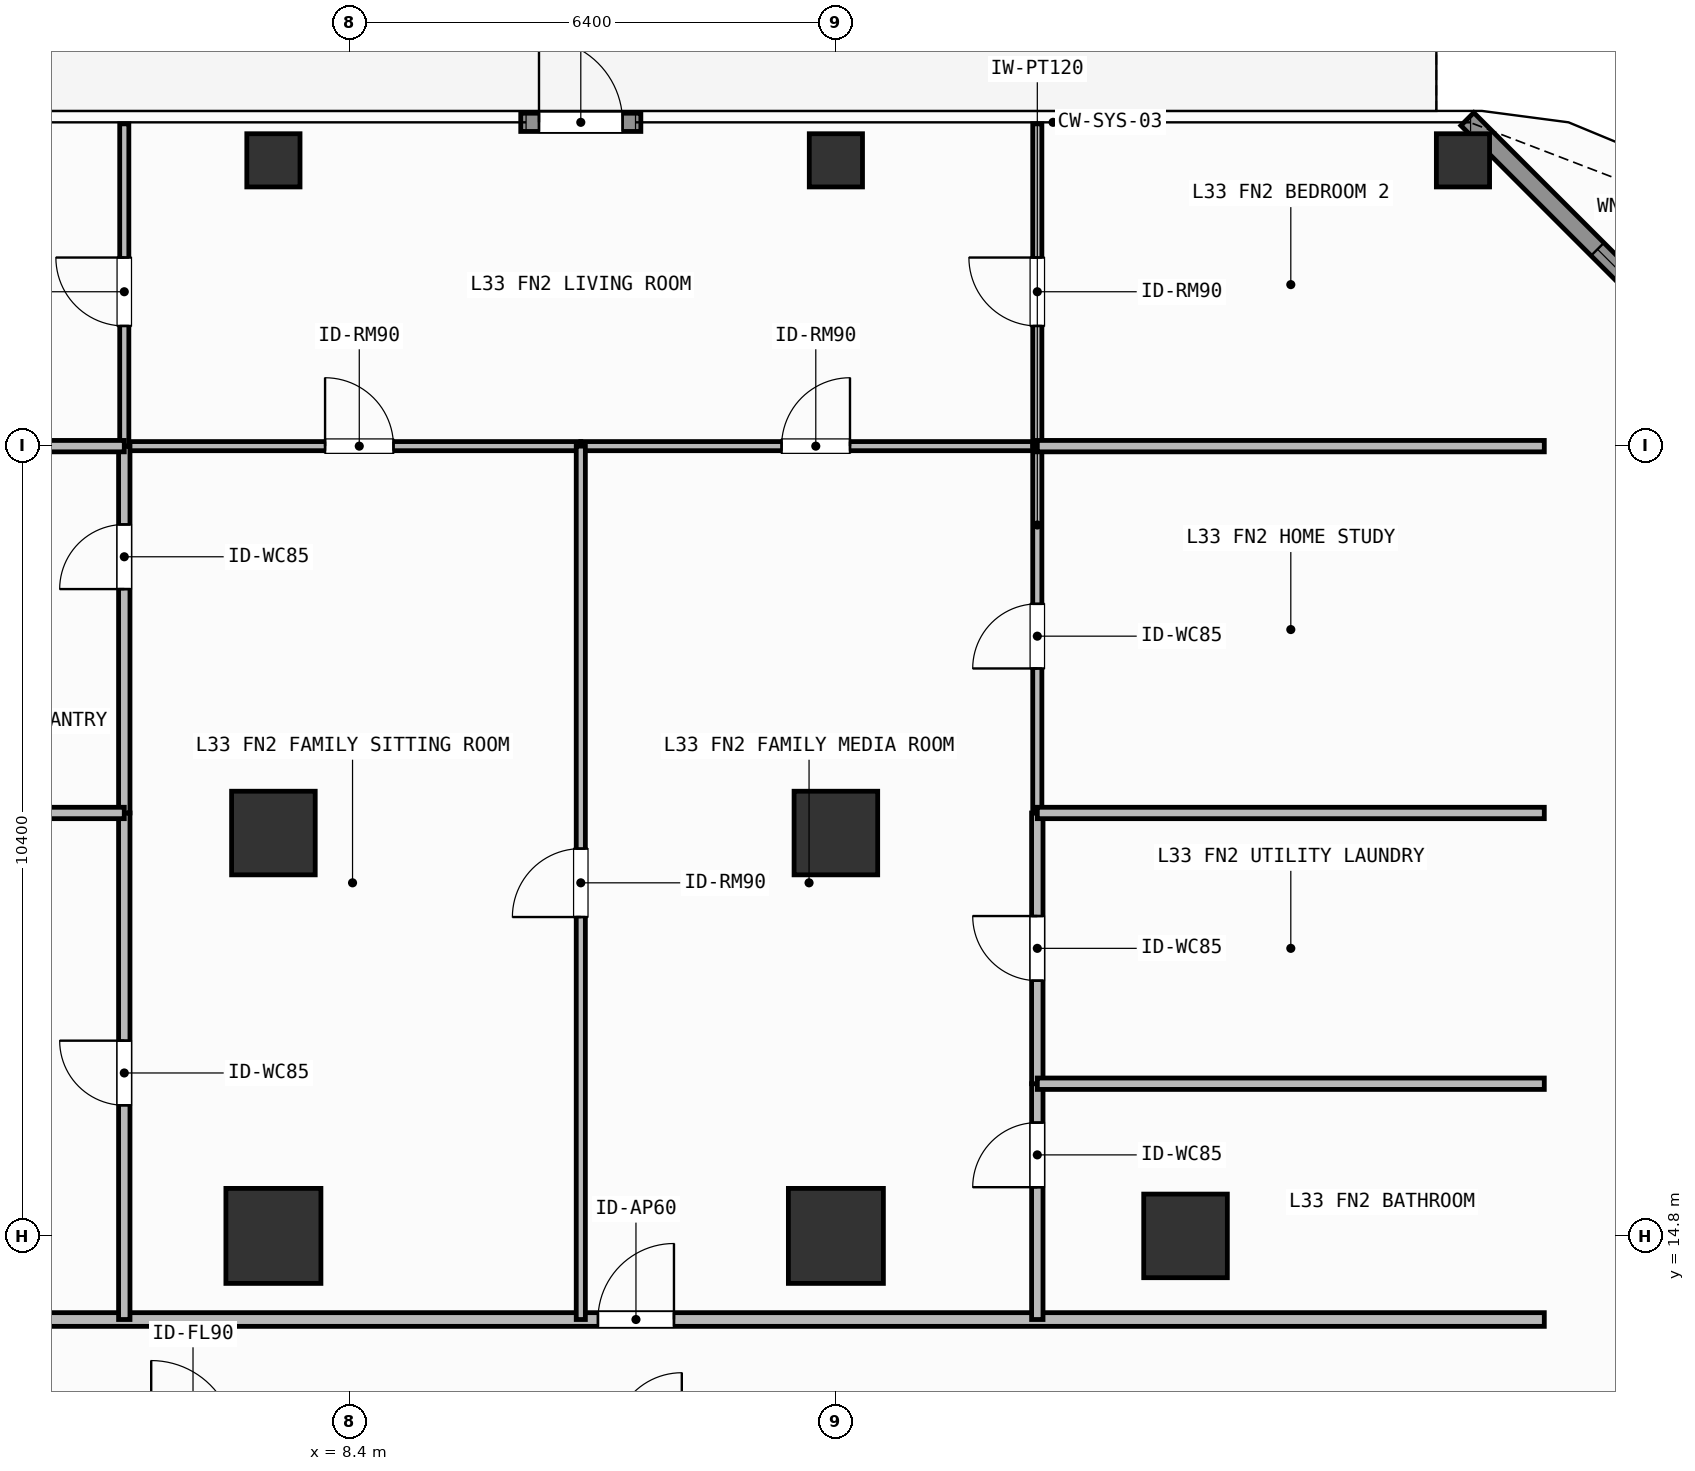
"""IFC4 building model, lengths in metres.
Left out: names, types, materials, properties, quantities, classifications, styles, units other than length and angle.
Written with IfcOpenShell. Run it as: python <this file> out.ifc"""

import sys

from ifc_helpers import new_model, si_unit, direction, frame, frame_2d, origin, origin_2d, place, context, subcontext, project, spatial, rectangle, hollow_rectangle, extrude, element, fill, save


model = new_model("IFC4")
c1 = context("Model", 3, precision=1e-05, world=origin(), true_north=direction((0.0, 1.0)))
c2 = subcontext(c1, "Body", "Model", "MODEL_VIEW")
j1 = project(units=[si_unit("LENGTHUNIT", "METRE"), si_unit("PLANEANGLEUNIT", "RADIAN")], contexts=[c1])
p1 = place(None, origin())
s1 = spatial("IfcSite", under=j1, at=p1, CompositionType="ELEMENT")
p2 = place(p1, origin())
s2 = spatial("IfcBuilding", under=s1, at=p2, CompositionType="ELEMENT")
p3 = place(p2, frame((0.0, 0.0, 132.9)))
s3 = spatial("IfcBuildingStorey", under=s2, at=p3, CompositionType="ELEMENT", Elevation=132.9)
for number, where, z_axis, x_axis in (
    (1, (7.4, 14.8, 0.0), (0.0, 0.0, 1.0), (1.0, 0.0, 0.0)),
    (2, (14.8, 14.8, 0.0), (0.0, 0.0, 1.0), (1.0, 0.0, 0.0)),
):
    element("IfcColumn", number, at=place(p3, frame(where, z_axis=z_axis, x_axis=x_axis)), inside=s3, PredefinedType="COLUMN", context=c2, shape_type="SweptSolid", body=[
        extrude(rectangle(XDim=1.25, YDim=1.25, at=origin_2d()), origin(), (0.0, 0.0, 1.0), 3.9),
    ])
for number, where, z_axis, x_axis in (
    (3, (19.4, 14.8, 0.0), (0.0, 0.0, 1.0), (1.0, 0.0, 0.0)),
    (4, (7.4, 20.1, 0.0), (0.0, 0.0, 1.0), (1.0, 0.0, 0.0)),
    (5, (14.8, 20.1, 0.0), (0.0, 0.0, 1.0), (1.0, 0.0, 0.0)),
):
    element("IfcColumn", number, at=place(p3, frame(where, z_axis=z_axis, x_axis=x_axis)), inside=s3, PredefinedType="COLUMN", context=c2, shape_type="SweptSolid", body=[
        extrude(rectangle(XDim=1.1, YDim=1.1, at=origin_2d()), origin(), (0.0, 0.0, 1.0), 3.9),
    ])
for number, where, z_axis, x_axis in (
    (6, (23.05, 28.95, 0.0), (0.0, 0.0, 1.0), (1.0, 0.0, 0.0)),
    (7, (7.4, 28.95, 0.0), (0.0, 0.0, 1.0), (1.0, 0.0, 0.0)),
    (8, (14.8, 28.95, 0.0), (0.0, 0.0, 1.0), (1.0, 0.0, 0.0)),
):
    element("IfcColumn", number, at=place(p3, frame(where, z_axis=z_axis, x_axis=x_axis)), inside=s3, PredefinedType="COLUMN", context=c2, shape_type="SweptSolid", body=[
        extrude(hollow_rectangle(XDim=0.7, YDim=0.7, WallThickness=0.032, at=origin_2d()), origin(), (0.0, 0.0, 1.0), 3.9),
    ])
p4 = place(p3, frame((10.654, 29.45, 0.0), z_axis=(0.0, 0.0, 1.0), x_axis=(1.0, 0.0, 0.0)))
e9 = element("IfcWall", 9, at=p4, inside=s3, PredefinedType="SOLIDWALL", context=c2, shape_type="SweptSolid", body=[
    extrude(rectangle(XDim=1.58, YDim=0.24, at=frame_2d((0.79, 0.0))), origin(), (0.0, 0.0, 1.0), 3.62),
])
p5 = place(p4, frame((0.24, 0.0, 0.0)))
e10 = element("IfcOpeningElement", 10, at=p5, cuts=e9, PredefinedType="OPENING", context=c2, shape_type="SweptSolid", body=[
    extrude(rectangle(XDim=1.1, YDim=2.2, at=frame_2d((0.55, 1.1))), frame((0.0, 0.13, 0.0), z_axis=(0.0, -1.0, 0.0), x_axis=(1.0, 0.0, 0.0)), (0.0, 0.0, 1.0), 0.26),
])
p6 = place(p3, frame((23.108, 29.492, 0.0), z_axis=(0.0, 0.0, 1.0), x_axis=(0.707087534163, -0.707126027686, 0.0)))
e11 = element("IfcWall", 11, at=p6, inside=s3, PredefinedType="SOLIDWALL", context=c2, shape_type="SweptSolid", body=[
    extrude(rectangle(XDim=6.342, YDim=0.24, at=frame_2d((3.171, 0.0))), origin(), (0.0, 0.0, 1.0), 3.62),
])
p7 = place(p6, frame((2.421, 0.0, 0.8)))
e12 = element("IfcOpeningElement", 12, at=p7, cuts=e11, PredefinedType="OPENING", context=c2, shape_type="SweptSolid", body=[
    extrude(rectangle(XDim=1.5, YDim=1.85, at=frame_2d((0.75, 0.925))), frame((0.0, 0.13, 0.0), z_axis=(0.0, -1.0, 0.0), x_axis=(1.0, 0.0, 0.0)), (0.0, 0.0, 1.0), 0.26),
])
p8 = place(p3, frame((1.474, 13.7, 0.0), z_axis=(0.0, 0.0, 1.0), x_axis=(1.0, 0.0, 0.0)))
e13 = element("IfcWall", 13, at=p8, inside=s3, PredefinedType="PARTITIONING", context=c2, shape_type="SweptSolid", body=[
    extrude(rectangle(XDim=22.646, YDim=0.18, at=frame_2d((11.323, 0.0))), origin(), (0.0, 0.0, 1.0), 3.62),
])
p9 = place(p8, frame((10.196, 0.0, 0.0)))
e14 = element("IfcOpeningElement", 14, at=p9, cuts=e13, PredefinedType="OPENING", context=c2, shape_type="SweptSolid", body=[
    extrude(rectangle(XDim=1.0, YDim=2.2, at=frame_2d((0.5, 1.1))), frame((0.0, 0.1, 0.0), z_axis=(0.0, -1.0, 0.0), x_axis=(1.0, 0.0, 0.0)), (0.0, 0.0, 1.0), 0.2),
])
p10 = place(p3, frame((5.438, 25.19, 0.0), z_axis=(0.0, 0.0, 1.0), x_axis=(1.0, 0.0, 0.0)))
e15 = element("IfcWall", 15, at=p10, inside=s3, PredefinedType="PARTITIONING", context=c2, shape_type="SweptSolid", body=[
    extrude(rectangle(XDim=6.006, YDim=0.12, at=frame_2d((3.003, 0.0))), origin(), (0.0, 0.0, 1.0), 3.62),
])
p11 = place(p10, frame((2.642, 0.0, 0.0)))
e16 = element("IfcOpeningElement", 16, at=p11, cuts=e15, PredefinedType="OPENING", context=c2, shape_type="SweptSolid", body=[
    extrude(rectangle(XDim=0.9, YDim=2.1, at=frame_2d((0.45, 1.05))), frame((0.0, 0.07, 0.0), z_axis=(0.0, -1.0, 0.0), x_axis=(1.0, 0.0, 0.0)), (0.0, 0.0, 1.0), 0.14),
])
p12 = place(p3, frame((11.444, 25.19, 0.0), z_axis=(0.0, 0.0, 1.0), x_axis=(1.0, 0.0, 0.0)))
e17 = element("IfcWall", 17, at=p12, inside=s3, PredefinedType="PARTITIONING", context=c2, shape_type="SweptSolid", body=[
    extrude(rectangle(XDim=6.006, YDim=0.12, at=frame_2d((3.003, 0.0))), origin(), (0.0, 0.0, 1.0), 3.62),
])
p13 = place(p12, frame((2.642, 0.0, 0.0)))
e18 = element("IfcOpeningElement", 18, at=p13, cuts=e17, PredefinedType="OPENING", context=c2, shape_type="SweptSolid", body=[
    extrude(rectangle(XDim=0.9, YDim=2.1, at=frame_2d((0.45, 1.05))), frame((0.0, 0.07, 0.0), z_axis=(0.0, -1.0, 0.0), x_axis=(1.0, 0.0, 0.0)), (0.0, 0.0, 1.0), 0.14),
])
p14 = place(p3, frame((11.444, 13.7, 0.0), z_axis=(0.0, 0.0, 1.0), x_axis=(0.0, 1.0, 0.0)))
e19 = element("IfcWall", 19, at=p14, inside=s3, PredefinedType="PARTITIONING", context=c2, shape_type="SweptSolid", body=[
    extrude(rectangle(XDim=11.49, YDim=0.12, at=frame_2d((5.745, 0.0))), origin(), (0.0, 0.0, 1.0), 3.62),
])
p15 = place(p14, frame((5.295, 0.0, 0.0)))
e20 = element("IfcOpeningElement", 20, at=p15, cuts=e19, PredefinedType="OPENING", context=c2, shape_type="SweptSolid", body=[
    extrude(rectangle(XDim=0.9, YDim=2.1, at=frame_2d((0.45, 1.05))), frame((0.0, 0.07, 0.0), z_axis=(0.0, -1.0, 0.0), x_axis=(1.0, 0.0, 0.0)), (0.0, 0.0, 1.0), 0.14),
])
p16 = place(p3, frame((5.438, 13.7, 0.0), z_axis=(0.0, 0.0, 1.0), x_axis=(0.0, 1.0, 0.0)))
e21 = element("IfcWall", 21, at=p16, inside=s3, PredefinedType="PARTITIONING", context=c2, shape_type="SweptSolid", body=[
    extrude(rectangle(XDim=6.664, YDim=0.15, at=frame_2d((3.332, 0.0))), origin(), (0.0, 0.0, 1.0), 3.62),
])
p17 = place(p16, frame((2.818, 0.0, 0.0)))
e22 = element("IfcOpeningElement", 22, at=p17, cuts=e21, PredefinedType="OPENING", context=c2, shape_type="SweptSolid", body=[
    extrude(rectangle(XDim=0.85, YDim=2.1, at=frame_2d((0.425, 1.05))), frame((0.0, 0.085, 0.0), z_axis=(0.0, -1.0, 0.0), x_axis=(1.0, 0.0, 0.0)), (0.0, 0.0, 1.0), 0.17),
])
p18 = place(p3, frame((5.438, 20.364, 0.0), z_axis=(0.0, 0.0, 1.0), x_axis=(0.0, 1.0, 0.0)))
e23 = element("IfcWall", 23, at=p18, inside=s3, PredefinedType="PARTITIONING", context=c2, shape_type="SweptSolid", body=[
    extrude(rectangle(XDim=4.826, YDim=0.15, at=frame_2d((2.413, 0.0))), origin(), (0.0, 0.0, 1.0), 3.62),
])
p19 = place(p18, frame((2.946, 0.0, 0.0)))
e24 = element("IfcOpeningElement", 24, at=p19, cuts=e23, PredefinedType="OPENING", context=c2, shape_type="SweptSolid", body=[
    extrude(rectangle(XDim=0.85, YDim=2.1, at=frame_2d((0.425, 1.05))), frame((0.0, 0.085, 0.0), z_axis=(0.0, -1.0, 0.0), x_axis=(1.0, 0.0, 0.0)), (0.0, 0.0, 1.0), 0.17),
])
p20 = place(p3, frame((5.438, 25.19, 0.0), z_axis=(0.0, 0.0, 1.0), x_axis=(0.0, 1.0, 0.0)))
e25 = element("IfcWall", 25, at=p20, inside=s3, PredefinedType="PARTITIONING", context=c2, shape_type="SweptSolid", body=[
    extrude(rectangle(XDim=4.24, YDim=0.12, at=frame_2d((2.12, 0.0))), origin(), (0.0, 0.0, 1.0), 3.62),
])
p21 = place(p20, frame((1.581, 0.0, 0.0)))
e26 = element("IfcOpeningElement", 26, at=p21, cuts=e25, PredefinedType="OPENING", context=c2, shape_type="SweptSolid", body=[
    extrude(rectangle(XDim=0.9, YDim=2.1, at=frame_2d((0.45, 1.05))), frame((0.0, 0.07, 0.0), z_axis=(0.0, -1.0, 0.0), x_axis=(1.0, 0.0, 0.0)), (0.0, 0.0, 1.0), 0.14),
])
p22 = place(p3, frame((17.45, 13.7, 0.0), z_axis=(0.0, 0.0, 1.0), x_axis=(0.0, 1.0, 0.0)))
e27 = element("IfcWall", 27, at=p22, inside=s3, PredefinedType="PARTITIONING", context=c2, shape_type="SweptSolid", body=[
    extrude(rectangle(XDim=3.102, YDim=0.15, at=frame_2d((1.551, 0.0))), origin(), (0.0, 0.0, 1.0), 3.62),
])
p23 = place(p22, frame((1.741, 0.0, 0.0)))
e28 = element("IfcOpeningElement", 28, at=p23, cuts=e27, PredefinedType="OPENING", context=c2, shape_type="SweptSolid", body=[
    extrude(rectangle(XDim=0.85, YDim=2.1, at=frame_2d((0.425, 1.05))), frame((0.0, 0.085, 0.0), z_axis=(0.0, -1.0, 0.0), x_axis=(1.0, 0.0, 0.0)), (0.0, 0.0, 1.0), 0.17),
])
p24 = place(p3, frame((17.45, 16.802, 0.0), z_axis=(0.0, 0.0, 1.0), x_axis=(0.0, 1.0, 0.0)))
e29 = element("IfcWall", 29, at=p24, inside=s3, PredefinedType="PARTITIONING", context=c2, shape_type="SweptSolid", body=[
    extrude(rectangle(XDim=3.562, YDim=0.15, at=frame_2d((1.781, 0.0))), origin(), (0.0, 0.0, 1.0), 3.62),
])
p25 = place(p24, frame((1.356, 0.0, 0.0)))
e30 = element("IfcOpeningElement", 30, at=p25, cuts=e29, PredefinedType="OPENING", context=c2, shape_type="SweptSolid", body=[
    extrude(rectangle(XDim=0.85, YDim=2.1, at=frame_2d((0.425, 1.05))), frame((0.0, 0.085, 0.0), z_axis=(0.0, -1.0, 0.0), x_axis=(1.0, 0.0, 0.0)), (0.0, 0.0, 1.0), 0.17),
])
p26 = place(p3, frame((17.45, 20.364, 0.0), z_axis=(0.0, 0.0, 1.0), x_axis=(0.0, 1.0, 0.0)))
e31 = element("IfcWall", 31, at=p26, inside=s3, PredefinedType="PARTITIONING", context=c2, shape_type="SweptSolid", body=[
    extrude(rectangle(XDim=4.826, YDim=0.12, at=frame_2d((2.413, 0.0))), origin(), (0.0, 0.0, 1.0), 3.62),
])
p27 = place(p26, frame((1.901, 0.0, 0.0)))
e32 = element("IfcOpeningElement", 32, at=p27, cuts=e31, PredefinedType="OPENING", context=c2, shape_type="SweptSolid", body=[
    extrude(rectangle(XDim=0.85, YDim=2.1, at=frame_2d((0.425, 1.05))), frame((0.0, 0.07, 0.0), z_axis=(0.0, -1.0, 0.0), x_axis=(1.0, 0.0, 0.0)), (0.0, 0.0, 1.0), 0.14),
])
p28 = place(p3, frame((17.45, 25.19, 0.0), z_axis=(0.0, 0.0, 1.0), x_axis=(0.0, 1.0, 0.0)))
e33 = element("IfcWall", 33, at=p28, inside=s3, PredefinedType="PARTITIONING", context=c2, shape_type="SweptSolid", body=[
    extrude(rectangle(XDim=4.24, YDim=0.12, at=frame_2d((2.12, 0.0))), origin(), (0.0, 0.0, 1.0), 3.62),
])
p29 = place(p28, frame((1.581, 0.0, 0.0)))
e34 = element("IfcOpeningElement", 34, at=p29, cuts=e33, PredefinedType="OPENING", context=c2, shape_type="SweptSolid", body=[
    extrude(rectangle(XDim=0.9, YDim=2.1, at=frame_2d((0.45, 1.05))), frame((0.0, 0.07, 0.0), z_axis=(0.0, -1.0, 0.0), x_axis=(1.0, 0.0, 0.0)), (0.0, 0.0, 1.0), 0.14),
])
p30 = place(p3, frame((1.474, 20.364, 0.0), z_axis=(0.0, 0.0, 1.0), x_axis=(1.0, 0.0, 0.0)))
e35 = element("IfcWall", 35, at=p30, inside=s3, PredefinedType="PARTITIONING", context=c2, shape_type="SweptSolid", body=[
    extrude(rectangle(XDim=3.964, YDim=0.15, at=frame_2d((1.982, 0.0))), origin(), (0.0, 0.0, 1.0), 2.71),
])
p31 = place(p3, frame((1.474, 25.19, 0.0), z_axis=(0.0, 0.0, 1.0), x_axis=(1.0, 0.0, 0.0)))
e36 = element("IfcWall", 36, at=p31, inside=s3, PredefinedType="PARTITIONING", context=c2, shape_type="SweptSolid", body=[
    extrude(rectangle(XDim=3.964, YDim=0.15, at=frame_2d((1.982, 0.0))), origin(), (0.0, 0.0, 1.0), 3.62),
])
for number, where, z_axis, x_axis in (
    (37, (17.45, 16.802, 0.0), (0.0, 0.0, 1.0), (1.0, 0.0, 0.0)),
    (38, (17.45, 20.364, 0.0), (0.0, 0.0, 1.0), (1.0, 0.0, 0.0)),
    (39, (17.45, 25.19, 0.0), (0.0, 0.0, 1.0), (1.0, 0.0, 0.0)),
):
    element("IfcWall", number, at=place(p3, frame(where, z_axis=z_axis, x_axis=x_axis)), inside=s3, PredefinedType="PARTITIONING", context=c2, shape_type="SweptSolid", body=[
        extrude(rectangle(XDim=6.67, YDim=0.15, at=frame_2d((3.335, 0.0))), origin(), (0.0, 0.0, 1.0), 3.62),
    ])
p32 = place(p5, origin())
e40 = element("IfcDoor", 40, at=p32, inside=s3, OperationType="SINGLE_SWING_LEFT", PredefinedType="DOOR", context=c2, shape_type="SweptSolid", body=[
    extrude(rectangle(XDim=1.1, YDim=2.2, at=frame_2d((0.55, 1.1))), frame((0.0, 0.025, 0.0), z_axis=(0.0, -1.0, 0.0), x_axis=(1.0, 0.0, 0.0)), (0.0, 0.0, 1.0), 0.05),
])
fill(e10, e40)
p33 = place(p7, origin())
e41 = element("IfcWindow", 41, at=p33, inside=s3, PartitioningType="SINGLE_PANEL", PredefinedType="WINDOW", context=c2, shape_type="SweptSolid", body=[
    extrude(rectangle(XDim=1.5, YDim=1.85, at=frame_2d((0.75, 0.925))), frame((0.0, 0.03, 0.0), z_axis=(0.0, -1.0, 0.0), x_axis=(1.0, 0.0, 0.0)), (0.0, 0.0, 1.0), 0.06),
])
fill(e12, e41)
p34 = place(p9, origin())
e42 = element("IfcDoor", 42, at=p34, inside=s3, OperationType="SINGLE_SWING_RIGHT", PredefinedType="DOOR", context=c2, shape_type="SweptSolid", body=[
    extrude(rectangle(XDim=1.0, YDim=2.2, at=frame_2d((0.5, 1.1))), frame((0.0, 0.025, 0.0), z_axis=(0.0, -1.0, 0.0), x_axis=(1.0, 0.0, 0.0)), (0.0, 0.0, 1.0), 0.05),
])
fill(e14, e42)
p35 = place(p11, origin())
e43 = element("IfcDoor", 43, at=p35, inside=s3, OperationType="SINGLE_SWING_LEFT", PredefinedType="DOOR", context=c2, shape_type="SweptSolid", body=[
    extrude(rectangle(XDim=0.9, YDim=2.1, at=frame_2d((0.45, 1.05))), frame((0.0, 0.025, 0.0), z_axis=(0.0, -1.0, 0.0), x_axis=(1.0, 0.0, 0.0)), (0.0, 0.0, 1.0), 0.05),
])
fill(e16, e43)
p36 = place(p13, origin())
e44 = element("IfcDoor", 44, at=p36, inside=s3, OperationType="SINGLE_SWING_RIGHT", PredefinedType="DOOR", context=c2, shape_type="SweptSolid", body=[
    extrude(rectangle(XDim=0.9, YDim=2.1, at=frame_2d((0.45, 1.05))), frame((0.0, 0.025, 0.0), z_axis=(0.0, -1.0, 0.0), x_axis=(1.0, 0.0, 0.0)), (0.0, 0.0, 1.0), 0.05),
])
fill(e18, e44)
p37 = place(p15, origin())
e45 = element("IfcDoor", 45, at=p37, inside=s3, OperationType="SINGLE_SWING_LEFT", PredefinedType="DOOR", context=c2, shape_type="SweptSolid", body=[
    extrude(rectangle(XDim=0.9, YDim=2.1, at=frame_2d((0.45, 1.05))), frame((0.0, 0.025, 0.0), z_axis=(0.0, -1.0, 0.0), x_axis=(1.0, 0.0, 0.0)), (0.0, 0.0, 1.0), 0.05),
])
fill(e20, e45)
p38 = place(p17, origin())
e46 = element("IfcDoor", 46, at=p38, inside=s3, OperationType="SINGLE_SWING_RIGHT", PredefinedType="DOOR", context=c2, shape_type="SweptSolid", body=[
    extrude(rectangle(XDim=0.85, YDim=2.1, at=frame_2d((0.425, 1.05))), frame((0.0, 0.025, 0.0), z_axis=(0.0, -1.0, 0.0), x_axis=(1.0, 0.0, 0.0)), (0.0, 0.0, 1.0), 0.05),
])
fill(e22, e46)
p39 = place(p19, origin())
e47 = element("IfcDoor", 47, at=p39, inside=s3, OperationType="SINGLE_SWING_LEFT", PredefinedType="DOOR", context=c2, shape_type="SweptSolid", body=[
    extrude(rectangle(XDim=0.85, YDim=2.1, at=frame_2d((0.425, 1.05))), frame((0.0, 0.025, 0.0), z_axis=(0.0, -1.0, 0.0), x_axis=(1.0, 0.0, 0.0)), (0.0, 0.0, 1.0), 0.05),
])
fill(e24, e47)
p40 = place(p21, origin())
e48 = element("IfcDoor", 48, at=p40, inside=s3, OperationType="SINGLE_SWING_RIGHT", PredefinedType="DOOR", context=c2, shape_type="SweptSolid", body=[
    extrude(rectangle(XDim=0.9, YDim=2.1, at=frame_2d((0.45, 1.05))), frame((0.0, 0.025, 0.0), z_axis=(0.0, -1.0, 0.0), x_axis=(1.0, 0.0, 0.0)), (0.0, 0.0, 1.0), 0.05),
])
fill(e26, e48)
p41 = place(p23, origin())
e49 = element("IfcDoor", 49, at=p41, inside=s3, OperationType="SINGLE_SWING_LEFT", PredefinedType="DOOR", context=c2, shape_type="SweptSolid", body=[
    extrude(rectangle(XDim=0.85, YDim=2.1, at=frame_2d((0.425, 1.05))), frame((0.0, 0.025, 0.0), z_axis=(0.0, -1.0, 0.0), x_axis=(1.0, 0.0, 0.0)), (0.0, 0.0, 1.0), 0.05),
])
fill(e28, e49)
p42 = place(p25, origin())
e50 = element("IfcDoor", 50, at=p42, inside=s3, OperationType="SINGLE_SWING_RIGHT", PredefinedType="DOOR", context=c2, shape_type="SweptSolid", body=[
    extrude(rectangle(XDim=0.85, YDim=2.1, at=frame_2d((0.425, 1.05))), frame((0.0, 0.025, 0.0), z_axis=(0.0, -1.0, 0.0), x_axis=(1.0, 0.0, 0.0)), (0.0, 0.0, 1.0), 0.05),
])
fill(e30, e50)
p43 = place(p27, origin())
e51 = element("IfcDoor", 51, at=p43, inside=s3, OperationType="SINGLE_SWING_LEFT", PredefinedType="DOOR", context=c2, shape_type="SweptSolid", body=[
    extrude(rectangle(XDim=0.85, YDim=2.1, at=frame_2d((0.425, 1.05))), frame((0.0, 0.025, 0.0), z_axis=(0.0, -1.0, 0.0), x_axis=(1.0, 0.0, 0.0)), (0.0, 0.0, 1.0), 0.05),
])
fill(e32, e51)
p44 = place(p29, origin())
e52 = element("IfcDoor", 52, at=p44, inside=s3, OperationType="SINGLE_SWING_RIGHT", PredefinedType="DOOR", context=c2, shape_type="SweptSolid", body=[
    extrude(rectangle(XDim=0.9, YDim=2.1, at=frame_2d((0.45, 1.05))), frame((0.0, 0.025, 0.0), z_axis=(0.0, -1.0, 0.0), x_axis=(1.0, 0.0, 0.0)), (0.0, 0.0, 1.0), 0.05),
])
fill(e34, e52)
save(model, sys.argv[1])
